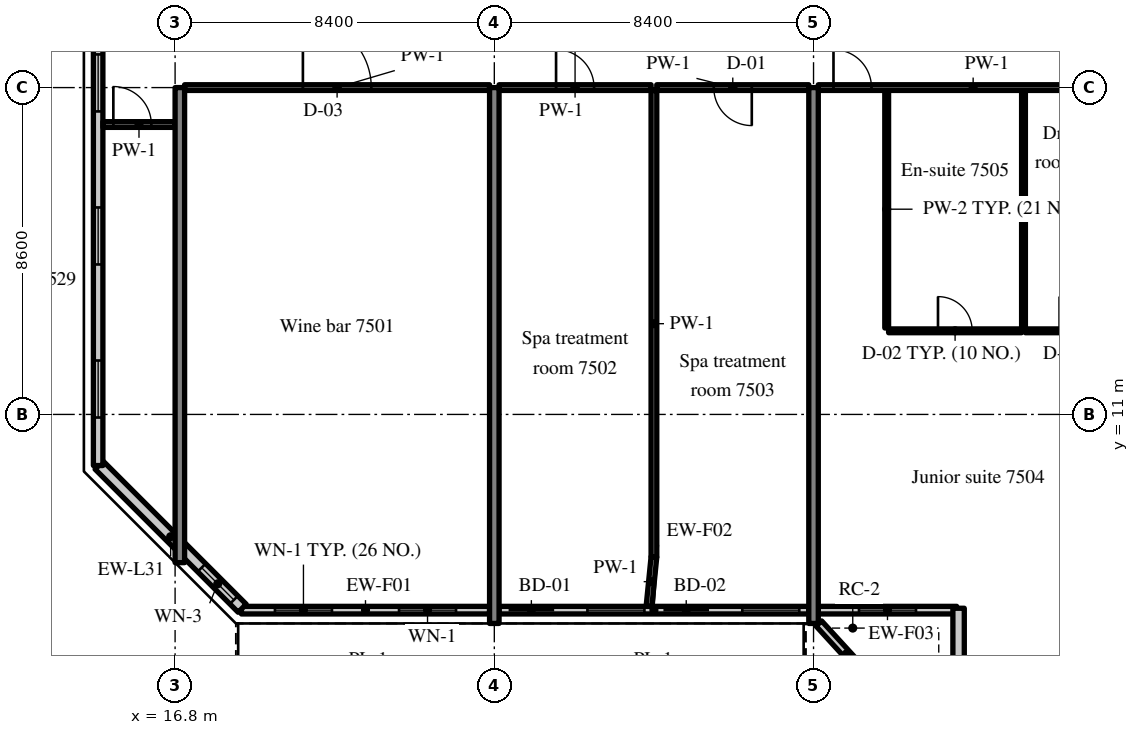
"""IFC4 building model, lengths in metres.
Left out: names, types, materials, properties, quantities, classifications, styles, units other than length and angle.
Written with IfcOpenShell. Run it as: python <this file> out.ifc"""

import sys

from ifc_helpers import new_model, si_unit, direction, frame, frame_2d, origin, place, context, subcontext, project, spatial, rectangle, extrude, source, transform, mapped, element, fill, save


model = new_model("IFC4")
c1 = context("Model", 3, precision=1e-05, world=origin(), true_north=direction((0.0, 1.0)))
c2 = subcontext(c1, "Body", "Model", "MODEL_VIEW")
j1 = project(units=[si_unit("LENGTHUNIT", "METRE"), si_unit("PLANEANGLEUNIT", "RADIAN")], contexts=[c1])
p1 = place(None, origin())
s1 = spatial("IfcSite", under=j1, at=p1, CompositionType="ELEMENT")
p2 = place(p1, origin())
s2 = spatial("IfcBuilding", under=s1, at=p2, CompositionType="ELEMENT")
p3 = place(p2, frame((0.0, 0.0, 313.7)))
s3 = spatial("IfcBuildingStorey", under=s2, at=p3, CompositionType="ELEMENT", Elevation=313.7)
m1 = source(origin(), c2, "Body", "SweptSolid", [
    extrude(rectangle(XDim=12.5, YDim=0.25, at=frame_2d((6.25, 0.0))), origin(), (0.0, 0.0, 1.0), 3.72),
])
p4 = place(p3, frame((16.925, 7.1, 0.0), z_axis=(0.0, 0.0, 1.0), x_axis=(0.0, 1.0, 0.0)))
e1 = element("IfcWall", 1, at=p4, inside=s3, PredefinedType="SHEAR", context=c2, shape_type="MappedRepresentation", body=[
    mapped(m1, transform((0.0, 0.0, 0.0), scale=1.0)),
])
m2 = source(origin(), c2, "Body", "SweptSolid", [
    extrude(rectangle(XDim=14.1, YDim=0.25, at=frame_2d((7.05, 0.0))), origin(), (0.0, 0.0, 1.0), 3.72),
])
for number, where, z_axis, x_axis in (
    (2, (25.2, 5.5, 0.0), (0.0, 0.0, 1.0), (0.0, 1.0, 0.0)),
    (3, (33.6, 5.5, 0.0), (0.0, 0.0, 1.0), (0.0, 1.0, 0.0)),
):
    element("IfcWall", number, at=place(p3, frame(where, z_axis=z_axis, x_axis=x_axis)), inside=s3, PredefinedType="SHEAR", context=c2, shape_type="MappedRepresentation", body=[
        mapped(m2, transform((0.0, 0.0, 0.0), scale=1.0)),
    ])
m3 = source(origin(), c2, "Body", "SweptSolid", [
    extrude(rectangle(XDim=6.53, YDim=0.2, at=frame_2d((3.265, 0.0))), origin(), (0.0, 0.0, 1.0), 3.17),
])
p5 = place(p3, frame((18.545, 5.85, 0.0), z_axis=(0.0, 0.0, 1.0), x_axis=(1.0, 0.0, 0.0)))
e4 = element("IfcWall", 4, at=p5, inside=s3, PredefinedType="SOLIDWALL", context=c2, shape_type="MappedRepresentation", body=[
    mapped(m3, transform((0.0, 0.0, 0.0), scale=1.0)),
])
m4 = source(origin(), c2, "Body", "SweptSolid", [
    extrude(rectangle(XDim=1.5, YDim=1.5, at=frame_2d((0.75, 0.75))), frame((0.0, 0.11, 0.0), z_axis=(0.0, -1.0, 0.0), x_axis=(1.0, 0.0, 0.0)), (0.0, 0.0, 1.0), 0.22),
])
p6 = place(p5, frame((0.883, 0.0, 0.9)))
e5 = element("IfcOpeningElement", 5, at=p6, cuts=e4, PredefinedType="OPENING", context=c2, shape_type="MappedRepresentation", body=[
    mapped(m4, transform((0.0, 0.0, 0.0), scale=1.0)),
])
p7 = place(p5, frame((4.147, 0.0, 0.9)))
e6 = element("IfcOpeningElement", 6, at=p7, cuts=e4, PredefinedType="OPENING", context=c2, shape_type="MappedRepresentation", body=[
    mapped(m4, transform((0.0, 0.0, 0.0), scale=1.0)),
])
m5 = source(origin(), c2, "Body", "SweptSolid", [
    extrude(rectangle(XDim=8.15, YDim=0.2, at=frame_2d((4.075, 0.0))), origin(), (0.0, 0.0, 1.0), 3.17),
])
p8 = place(p3, frame((25.325, 5.85, 0.0), z_axis=(0.0, 0.0, 1.0), x_axis=(1.0, 0.0, 0.0)))
e7 = element("IfcWall", 7, at=p8, inside=s3, PredefinedType="SOLIDWALL", context=c2, shape_type="MappedRepresentation", body=[
    mapped(m5, transform((0.0, 0.0, 0.0), scale=1.0)),
])
m6 = source(origin(), c2, "Body", "SweptSolid", [
    extrude(rectangle(XDim=1.2, YDim=2.4, at=frame_2d((0.6, 1.2))), frame((0.0, 0.11, 0.0), z_axis=(0.0, -1.0, 0.0), x_axis=(1.0, 0.0, 0.0)), (0.0, 0.0, 1.0), 0.22),
])
p9 = place(p8, frame((0.25, 0.0, 0.0)))
e8 = element("IfcOpeningElement", 8, at=p9, cuts=e7, PredefinedType="OPENING", context=c2, shape_type="MappedRepresentation", body=[
    mapped(m6, transform((0.0, 0.0, 0.0), scale=1.0)),
])
p10 = place(p8, frame((2.325, 0.0, 0.9)))
e9 = element("IfcOpeningElement", 9, at=p10, cuts=e7, PredefinedType="OPENING", context=c2, shape_type="MappedRepresentation", body=[
    mapped(m4, transform((0.0, 0.0, 0.0), scale=1.0)),
])
p11 = place(p8, frame((4.325, 0.0, 0.0)))
e10 = element("IfcOpeningElement", 10, at=p11, cuts=e7, PredefinedType="OPENING", context=c2, shape_type="MappedRepresentation", body=[
    mapped(m6, transform((0.0, 0.0, 0.0), scale=1.0)),
])
p12 = place(p8, frame((6.4, 0.0, 0.9)))
e11 = element("IfcOpeningElement", 11, at=p12, cuts=e7, PredefinedType="OPENING", context=c2, shape_type="MappedRepresentation", body=[
    mapped(m4, transform((0.0, 0.0, 0.0), scale=1.0)),
])
m7 = source(origin(), c2, "Body", "SweptSolid", [
    extrude(rectangle(XDim=3.642, YDim=0.2, at=frame_2d((1.821, 0.0))), origin(), (0.0, 0.0, 1.0), 3.17),
])
p13 = place(p3, frame((33.725, 5.85, 0.0), z_axis=(0.0, 0.0, 1.0), x_axis=(1.0, 0.0, 0.0)))
e12 = element("IfcWall", 12, at=p13, inside=s3, PredefinedType="SOLIDWALL", context=c2, shape_type="MappedRepresentation", body=[
    mapped(m7, transform((0.0, 0.0, 0.0), scale=1.0)),
])
p14 = place(p13, frame((1.071, 0.0, 0.9)))
e13 = element("IfcOpeningElement", 13, at=p14, cuts=e12, PredefinedType="OPENING", context=c2, shape_type="MappedRepresentation", body=[
    mapped(m4, transform((0.0, 0.0, 0.0), scale=1.0)),
])
m8 = source(origin(), c2, "Body", "SweptSolid", [
    extrude(rectangle(XDim=3.064, YDim=0.3, at=frame_2d((1.532, 0.0))), origin(), (0.0, 0.0, 1.0), 3.72),
])
p15 = place(p3, frame((37.417, 5.9, 0.0), z_axis=(0.0, 0.0, 1.0), x_axis=(0.0, -1.0, 0.0)))
e14 = element("IfcWall", 14, at=p15, inside=s3, PredefinedType="SOLIDWALL", context=c2, shape_type="MappedRepresentation", body=[
    mapped(m8, transform((0.0, 0.0, 0.0), scale=1.0)),
])
m9 = source(origin(), c2, "Body", "SweptSolid", [
    extrude(rectangle(XDim=5.326, YDim=0.3, at=frame_2d((2.663, 0.0))), origin(), (0.0, 0.0, 1.0), 3.72),
])
p16 = place(p3, frame((14.8, 9.666, 0.0), z_axis=(0.0, 0.0, 1.0), x_axis=(0.707083859269, -0.707129702361, 0.0)))
e15 = element("IfcWall", 15, at=p16, inside=s3, PredefinedType="SOLIDWALL", context=c2, shape_type="MappedRepresentation", body=[
    mapped(m9, transform((0.0, 0.0, 0.0), scale=1.0)),
])
m10 = source(origin(), c2, "Body", "SweptSolid", [
    extrude(rectangle(XDim=1.2, YDim=1.5, at=frame_2d((0.6, 0.75))), frame((0.0, 0.16, 0.0), z_axis=(0.0, -1.0, 0.0), x_axis=(1.0, 0.0, 0.0)), (0.0, 0.0, 1.0), 0.32),
])
p17 = place(p16, frame((3.815, 0.0, 0.9)))
e16 = element("IfcOpeningElement", 16, at=p17, cuts=e15, PredefinedType="OPENING", context=c2, shape_type="MappedRepresentation", body=[
    mapped(m10, transform((0.0, 0.0, 0.0), scale=1.0)),
])
m11 = source(origin(), c2, "Body", "SweptSolid", [
    extrude(rectangle(XDim=28.189, YDim=0.25, at=frame_2d((14.095, 0.0))), origin(), (0.0, 0.0, 1.0), 3.72),
])
p18 = place(p3, frame((14.775, 37.845, 0.0), z_axis=(0.0, 0.0, 1.0), x_axis=(0.0, -1.0, 0.0)))
e17 = element("IfcWall", 17, at=p18, inside=s3, PredefinedType="SOLIDWALL", context=c2, shape_type="MappedRepresentation", body=[
    mapped(m11, transform((0.0, 0.0, 0.0), scale=1.0)),
])
m12 = source(origin(), c2, "Body", "SweptSolid", [
    extrude(rectangle(XDim=1.5, YDim=1.5, at=frame_2d((0.75, 0.75))), frame((0.0, 0.135, 0.0), z_axis=(0.0, -1.0, 0.0), x_axis=(1.0, 0.0, 0.0)), (0.0, 0.0, 1.0), 0.27),
])
p19 = place(p18, frame((1.263, 0.0, 0.9)))
e18 = element("IfcOpeningElement", 18, at=p19, cuts=e17, PredefinedType="OPENING", context=c2, shape_type="MappedRepresentation", body=[
    mapped(m12, transform((0.0, 0.0, 0.0), scale=1.0)),
])
p20 = place(p18, frame((5.291, 0.0, 0.9)))
e19 = element("IfcOpeningElement", 19, at=p20, cuts=e17, PredefinedType="OPENING", context=c2, shape_type="MappedRepresentation", body=[
    mapped(m12, transform((0.0, 0.0, 0.0), scale=1.0)),
])
p21 = place(p18, frame((9.318, 0.0, 0.9)))
e20 = element("IfcOpeningElement", 20, at=p21, cuts=e17, PredefinedType="OPENING", context=c2, shape_type="MappedRepresentation", body=[
    mapped(m12, transform((0.0, 0.0, 0.0), scale=1.0)),
])
p22 = place(p18, frame((13.345, 0.0, 0.9)))
e21 = element("IfcOpeningElement", 21, at=p22, cuts=e17, PredefinedType="OPENING", context=c2, shape_type="MappedRepresentation", body=[
    mapped(m12, transform((0.0, 0.0, 0.0), scale=1.0)),
])
p23 = place(p18, frame((17.372, 0.0, 0.9)))
e22 = element("IfcOpeningElement", 22, at=p23, cuts=e17, PredefinedType="OPENING", context=c2, shape_type="MappedRepresentation", body=[
    mapped(m12, transform((0.0, 0.0, 0.0), scale=1.0)),
])
p24 = place(p18, frame((21.399, 0.0, 0.9)))
e23 = element("IfcOpeningElement", 23, at=p24, cuts=e17, PredefinedType="OPENING", context=c2, shape_type="MappedRepresentation", body=[
    mapped(m12, transform((0.0, 0.0, 0.0), scale=1.0)),
])
p25 = place(p18, frame((25.426, 0.0, 0.9)))
e24 = element("IfcOpeningElement", 24, at=p25, cuts=e17, PredefinedType="OPENING", context=c2, shape_type="MappedRepresentation", body=[
    mapped(m12, transform((0.0, 0.0, 0.0), scale=1.0)),
])
m13 = source(origin(), c2, "Body", "SweptSolid", [
    extrude(rectangle(XDim=2.164, YDim=0.2, at=frame_2d((1.082, 0.0))), origin(), (0.0, 0.0, 1.0), 1.1),
])
p26 = place(p3, frame((35.2, 3.904, -0.05), z_axis=(0.0, 0.0, 1.0), x_axis=(-0.675280003013, 0.737561466951, 0.0)))
e25 = element("IfcWall", 25, at=p26, inside=s3, PredefinedType="PARAPET", context=c2, shape_type="MappedRepresentation", body=[
    mapped(m13, transform((0.0, 0.0, 0.0), scale=1.0)),
])
m14 = source(origin(), c2, "Body", "SweptSolid", [
    extrude(rectangle(XDim=8.025, YDim=0.15, at=frame_2d((4.012, 0.0))), origin(), (0.0, 0.0, 1.0), 3.02),
])
p27 = place(p3, frame((17.05, 19.6, 0.0), z_axis=(0.0, 0.0, 1.0), x_axis=(1.0, 0.0, 0.0)))
e26 = element("IfcWall", 26, at=p27, inside=s3, PredefinedType="PARTITIONING", context=c2, shape_type="MappedRepresentation", body=[
    mapped(m14, transform((0.0, 0.0, 0.0), scale=1.0)),
])
m15 = source(origin(), c2, "Body", "SweptSolid", [
    extrude(rectangle(XDim=1.8, YDim=2.1, at=frame_2d((0.9, 1.05))), frame((0.0, 0.085, 0.0), z_axis=(0.0, -1.0, 0.0), x_axis=(1.0, 0.0, 0.0)), (0.0, 0.0, 1.0), 0.17),
])
p28 = place(p27, frame((3.113, 0.0, 0.0)))
e27 = element("IfcOpeningElement", 27, at=p28, cuts=e26, PredefinedType="OPENING", context=c2, shape_type="MappedRepresentation", body=[
    mapped(m15, transform((0.0, 0.0, 0.0), scale=1.0)),
])
m16 = source(origin(), c2, "Body", "SweptSolid", [
    extrude(rectangle(XDim=4.0, YDim=0.15, at=frame_2d((2.0, 0.0))), origin(), (0.0, 0.0, 1.0), 3.02),
])
p29 = place(p3, frame((25.325, 19.6, 0.0), z_axis=(0.0, 0.0, 1.0), x_axis=(1.0, 0.0, 0.0)))
e28 = element("IfcWall", 28, at=p29, inside=s3, PredefinedType="PARTITIONING", context=c2, shape_type="MappedRepresentation", body=[
    mapped(m16, transform((0.0, 0.0, 0.0), scale=1.0)),
])
m17 = source(origin(), c2, "Body", "SweptSolid", [
    extrude(rectangle(XDim=1.0, YDim=2.1, at=frame_2d((0.5, 1.05))), frame((0.0, 0.085, 0.0), z_axis=(0.0, -1.0, 0.0), x_axis=(1.0, 0.0, 0.0)), (0.0, 0.0, 1.0), 0.17),
])
p30 = place(p29, frame((1.5, 0.0, 0.0)))
e29 = element("IfcOpeningElement", 29, at=p30, cuts=e28, PredefinedType="OPENING", context=c2, shape_type="MappedRepresentation", body=[
    mapped(m17, transform((0.0, 0.0, 0.0), scale=1.0)),
])
p31 = place(p3, frame((29.475, 19.6, 0.0), z_axis=(0.0, 0.0, 1.0), x_axis=(1.0, 0.0, 0.0)))
e30 = element("IfcWall", 30, at=p31, inside=s3, PredefinedType="PARTITIONING", context=c2, shape_type="MappedRepresentation", body=[
    mapped(m16, transform((0.0, 0.0, 0.0), scale=1.0)),
])
p32 = place(p31, frame((1.5, 0.0, 0.0)))
e31 = element("IfcOpeningElement", 31, at=p32, cuts=e30, PredefinedType="OPENING", context=c2, shape_type="MappedRepresentation", body=[
    mapped(m17, transform((0.0, 0.0, 0.0), scale=1.0)),
])
m18 = source(origin(), c2, "Body", "SweptSolid", [
    extrude(rectangle(XDim=12.275, YDim=0.15, at=frame_2d((6.137, 0.0))), origin(), (0.0, 0.0, 1.0), 3.72),
])
p33 = place(p3, frame((29.4, 7.25, 0.0), z_axis=(0.0, 0.0, 1.0), x_axis=(0.0, 1.0, 0.0)))
e32 = element("IfcWall", 32, at=p33, inside=s3, PredefinedType="PARTITIONING", context=c2, shape_type="MappedRepresentation", body=[
    mapped(m18, transform((0.0, 0.0, 0.0), scale=1.0)),
])
m19 = source(origin(), c2, "Body", "SweptSolid", [
    extrude(rectangle(XDim=6.25, YDim=0.1, at=frame_2d((3.125, 0.0))), origin(), (0.0, 0.0, 1.0), 3.72),
])
for number, where, z_axis, x_axis in (
    (33, (35.525, 13.275, 0.0), (0.0, 0.0, 1.0), (0.0, 1.0, 0.0)),
    (34, (39.125, 13.275, 0.0), (0.0, 0.0, 1.0), (0.0, 1.0, 0.0)),
):
    element("IfcWall", number, at=place(p3, frame(where, z_axis=z_axis, x_axis=x_axis)), inside=s3, PredefinedType="PARTITIONING", context=c2, shape_type="MappedRepresentation", body=[
        mapped(m19, transform((0.0, 0.0, 0.0), scale=1.0)),
    ])
m20 = source(origin(), c2, "Body", "SweptSolid", [
    extrude(rectangle(XDim=3.5, YDim=0.1, at=frame_2d((1.75, 0.0))), origin(), (0.0, 0.0, 1.0), 3.72),
])
p34 = place(p3, frame((35.575, 13.2, 0.0), z_axis=(0.0, 0.0, 1.0), x_axis=(1.0, 0.0, 0.0)))
e35 = element("IfcWall", 35, at=p34, inside=s3, PredefinedType="PARTITIONING", context=c2, shape_type="MappedRepresentation", body=[
    mapped(m20, transform((0.0, 0.0, 0.0), scale=1.0)),
])
m21 = source(origin(), c2, "Body", "SweptSolid", [
    extrude(rectangle(XDim=0.9, YDim=2.1, at=frame_2d((0.45, 1.05))), frame((0.0, 0.06, 0.0), z_axis=(0.0, -1.0, 0.0), x_axis=(1.0, 0.0, 0.0)), (0.0, 0.0, 1.0), 0.12),
])
p35 = place(p34, frame((1.3, 0.0, 0.0)))
e36 = element("IfcOpeningElement", 36, at=p35, cuts=e35, PredefinedType="OPENING", context=c2, shape_type="MappedRepresentation", body=[
    mapped(m21, transform((0.0, 0.0, 0.0), scale=1.0)),
])
m22 = source(origin(), c2, "Body", "SweptSolid", [
    extrude(rectangle(XDim=2.7, YDim=0.1, at=frame_2d((1.35, 0.0))), origin(), (0.0, 0.0, 1.0), 3.72),
])
p36 = place(p3, frame((39.175, 13.2, 0.0), z_axis=(0.0, 0.0, 1.0), x_axis=(1.0, 0.0, 0.0)))
e37 = element("IfcWall", 37, at=p36, inside=s3, PredefinedType="PARTITIONING", context=c2, shape_type="MappedRepresentation", body=[
    mapped(m22, transform((0.0, 0.0, 0.0), scale=1.0)),
])
p37 = place(p36, frame((0.9, 0.0, 0.0)))
e38 = element("IfcOpeningElement", 38, at=p37, cuts=e37, PredefinedType="OPENING", context=c2, shape_type="MappedRepresentation", body=[
    mapped(m21, transform((0.0, 0.0, 0.0), scale=1.0)),
])
m23 = source(origin(), c2, "Body", "SweptSolid", [
    extrude(rectangle(XDim=8.15, YDim=0.15, at=frame_2d((4.075, 0.0))), origin(), (0.0, 0.0, 1.0), 3.02),
])
p38 = place(p3, frame((33.725, 19.6, 0.0), z_axis=(0.0, 0.0, 1.0), x_axis=(1.0, 0.0, 0.0)))
e39 = element("IfcWall", 39, at=p38, inside=s3, PredefinedType="PARTITIONING", context=c2, shape_type="MappedRepresentation", body=[
    mapped(m23, transform((0.0, 0.0, 0.0), scale=1.0)),
])
p39 = place(p38, frame((0.4, 0.0, 0.0)))
e40 = element("IfcOpeningElement", 40, at=p39, cuts=e39, PredefinedType="OPENING", context=c2, shape_type="MappedRepresentation", body=[
    mapped(m17, transform((0.0, 0.0, 0.0), scale=1.0)),
])
m24 = source(origin(), c2, "Body", "SweptSolid", [
    extrude(rectangle(XDim=1.9, YDim=0.15, at=frame_2d((0.95, 0.0))), origin(), (0.0, 0.0, 1.0), 3.02),
])
p40 = place(p3, frame((14.9, 18.628, 0.0), z_axis=(0.0, 0.0, 1.0), x_axis=(1.0, 0.0, 0.0)))
e41 = element("IfcWall", 41, at=p40, inside=s3, PredefinedType="PARTITIONING", context=c2, shape_type="MappedRepresentation", body=[
    mapped(m24, transform((0.0, 0.0, 0.0), scale=1.0)),
])
p41 = place(p40, frame((0.275, 0.0, 0.0)))
e42 = element("IfcOpeningElement", 42, at=p41, cuts=e41, PredefinedType="OPENING", context=c2, shape_type="MappedRepresentation", body=[
    mapped(m17, transform((0.0, 0.0, 0.0), scale=1.0)),
])
m25 = source(origin(), c2, "Body", "SweptSolid", [
    extrude(rectangle(XDim=1.307, YDim=0.15, at=frame_2d((0.653, 0.0))), origin(), (0.0, 0.0, 1.0), 3.72),
])
p42 = place(p3, frame((29.27, 5.95, 0.0), z_axis=(0.0, 0.0, 1.0), x_axis=(0.099411212066, 0.995046436562, 0.0)))
e43 = element("IfcWall", 43, at=p42, inside=s3, PredefinedType="PARTITIONING", context=c2, shape_type="MappedRepresentation", body=[
    mapped(m25, transform((0.0, 0.0, 0.0), scale=1.0)),
])
m26 = source(origin(), c2, "Body", "SweptSolid", [
    extrude(rectangle(XDim=1.5, YDim=1.5, at=frame_2d((0.75, 0.75))), frame((0.0, 0.03, 0.0), z_axis=(0.0, -1.0, 0.0), x_axis=(1.0, 0.0, 0.0)), (0.0, 0.0, 1.0), 0.06),
])
p43 = place(p6, origin())
e44 = element("IfcWindow", 44, at=p43, inside=s3, PartitioningType="SINGLE_PANEL", PredefinedType="WINDOW", context=c2, shape_type="MappedRepresentation", body=[
    mapped(m26, transform((0.0, 0.0, 0.0), scale=1.0)),
])
fill(e5, e44)
p44 = place(p7, origin())
e45 = element("IfcWindow", 45, at=p44, inside=s3, PartitioningType="SINGLE_PANEL", PredefinedType="WINDOW", context=c2, shape_type="MappedRepresentation", body=[
    mapped(m26, transform((0.0, 0.0, 0.0), scale=1.0)),
])
fill(e6, e45)
m27 = source(origin(), c2, "Body", "SweptSolid", [
    extrude(rectangle(XDim=1.2, YDim=2.4, at=frame_2d((0.6, 1.2))), frame((0.0, 0.025, 0.0), z_axis=(0.0, -1.0, 0.0), x_axis=(1.0, 0.0, 0.0)), (0.0, 0.0, 1.0), 0.05),
])
p45 = place(p9, origin())
e46 = element("IfcDoor", 46, at=p45, inside=s3, OperationType="SLIDING_TO_LEFT", PredefinedType="DOOR", context=c2, shape_type="MappedRepresentation", body=[
    mapped(m27, transform((0.0, 0.0, 0.0), scale=1.0)),
])
fill(e8, e46)
p46 = place(p10, origin())
e47 = element("IfcWindow", 47, at=p46, inside=s3, PartitioningType="SINGLE_PANEL", PredefinedType="WINDOW", context=c2, shape_type="MappedRepresentation", body=[
    mapped(m26, transform((0.0, 0.0, 0.0), scale=1.0)),
])
fill(e9, e47)
p47 = place(p11, origin())
e48 = element("IfcDoor", 48, at=p47, inside=s3, OperationType="SLIDING_TO_RIGHT", PredefinedType="DOOR", context=c2, shape_type="MappedRepresentation", body=[
    mapped(m27, transform((0.0, 0.0, 0.0), scale=1.0)),
])
fill(e10, e48)
p48 = place(p12, origin())
e49 = element("IfcWindow", 49, at=p48, inside=s3, PartitioningType="SINGLE_PANEL", PredefinedType="WINDOW", context=c2, shape_type="MappedRepresentation", body=[
    mapped(m26, transform((0.0, 0.0, 0.0), scale=1.0)),
])
fill(e11, e49)
p49 = place(p14, origin())
e50 = element("IfcWindow", 50, at=p49, inside=s3, PartitioningType="SINGLE_PANEL", PredefinedType="WINDOW", context=c2, shape_type="MappedRepresentation", body=[
    mapped(m26, transform((0.0, 0.0, 0.0), scale=1.0)),
])
fill(e13, e50)
m28 = source(origin(), c2, "Body", "SweptSolid", [
    extrude(rectangle(XDim=1.2, YDim=1.5, at=frame_2d((0.6, 0.75))), frame((0.0, 0.03, 0.0), z_axis=(0.0, -1.0, 0.0), x_axis=(1.0, 0.0, 0.0)), (0.0, 0.0, 1.0), 0.06),
])
p50 = place(p17, origin())
e51 = element("IfcWindow", 51, at=p50, inside=s3, PartitioningType="SINGLE_PANEL", PredefinedType="WINDOW", context=c2, shape_type="MappedRepresentation", body=[
    mapped(m28, transform((0.0, 0.0, 0.0), scale=1.0)),
])
fill(e16, e51)
p51 = place(p23, origin())
e52 = element("IfcWindow", 52, at=p51, inside=s3, PartitioningType="SINGLE_PANEL", PredefinedType="WINDOW", context=c2, shape_type="MappedRepresentation", body=[
    mapped(m26, transform((0.0, 0.0, 0.0), scale=1.0)),
])
fill(e22, e52)
p52 = place(p24, origin())
e53 = element("IfcWindow", 53, at=p52, inside=s3, PartitioningType="SINGLE_PANEL", PredefinedType="WINDOW", context=c2, shape_type="MappedRepresentation", body=[
    mapped(m26, transform((0.0, 0.0, 0.0), scale=1.0)),
])
fill(e23, e53)
p53 = place(p25, origin())
e54 = element("IfcWindow", 54, at=p53, inside=s3, PartitioningType="SINGLE_PANEL", PredefinedType="WINDOW", context=c2, shape_type="MappedRepresentation", body=[
    mapped(m26, transform((0.0, 0.0, 0.0), scale=1.0)),
])
fill(e24, e54)
m29 = source(origin(), c2, "Body", "SweptSolid", [
    extrude(rectangle(XDim=1.8, YDim=2.1, at=frame_2d((0.9, 1.05))), frame((0.0, 0.025, 0.0), z_axis=(0.0, -1.0, 0.0), x_axis=(1.0, 0.0, 0.0)), (0.0, 0.0, 1.0), 0.05),
])
p54 = place(p28, origin())
e55 = element("IfcDoor", 55, at=p54, inside=s3, OperationType="DOUBLE_DOOR_SINGLE_SWING", PredefinedType="DOOR", context=c2, shape_type="MappedRepresentation", body=[
    mapped(m29, transform((0.0, 0.0, 0.0), scale=1.0)),
])
fill(e27, e55)
m30 = source(origin(), c2, "Body", "SweptSolid", [
    extrude(rectangle(XDim=1.0, YDim=2.1, at=frame_2d((0.5, 1.05))), frame((0.0, 0.025, 0.0), z_axis=(0.0, -1.0, 0.0), x_axis=(1.0, 0.0, 0.0)), (0.0, 0.0, 1.0), 0.05),
])
p55 = place(p30, origin())
e56 = element("IfcDoor", 56, at=p55, inside=s3, OperationType="SINGLE_SWING_LEFT", PredefinedType="DOOR", context=c2, shape_type="MappedRepresentation", body=[
    mapped(m30, transform((0.0, 0.0, 0.0), scale=1.0)),
])
fill(e29, e56)
p56 = place(p32, origin())
e57 = element("IfcDoor", 57, at=p56, inside=s3, OperationType="SINGLE_SWING_RIGHT", PredefinedType="DOOR", context=c2, shape_type="MappedRepresentation", body=[
    mapped(m30, transform((0.0, 0.0, 0.0), scale=1.0)),
])
fill(e31, e57)
m31 = source(origin(), c2, "Body", "SweptSolid", [
    extrude(rectangle(XDim=0.9, YDim=2.1, at=frame_2d((0.45, 1.05))), frame((0.0, 0.025, 0.0), z_axis=(0.0, -1.0, 0.0), x_axis=(1.0, 0.0, 0.0)), (0.0, 0.0, 1.0), 0.05),
])
p57 = place(p35, origin())
e58 = element("IfcDoor", 58, at=p57, inside=s3, OperationType="SINGLE_SWING_LEFT", PredefinedType="DOOR", context=c2, shape_type="MappedRepresentation", body=[
    mapped(m31, transform((0.0, 0.0, 0.0), scale=1.0)),
])
fill(e36, e58)
p58 = place(p39, origin())
e59 = element("IfcDoor", 59, at=p58, inside=s3, OperationType="SINGLE_SWING_LEFT", PredefinedType="DOOR", context=c2, shape_type="MappedRepresentation", body=[
    mapped(m30, transform((0.0, 0.0, 0.0), scale=1.0)),
])
fill(e40, e59)
p59 = place(p41, origin())
e60 = element("IfcDoor", 60, at=p59, inside=s3, OperationType="SINGLE_SWING_LEFT", PredefinedType="DOOR", context=c2, shape_type="MappedRepresentation", body=[
    mapped(m30, transform((0.0, 0.0, 0.0), scale=1.0)),
])
fill(e42, e60)
save(model, sys.argv[1])
